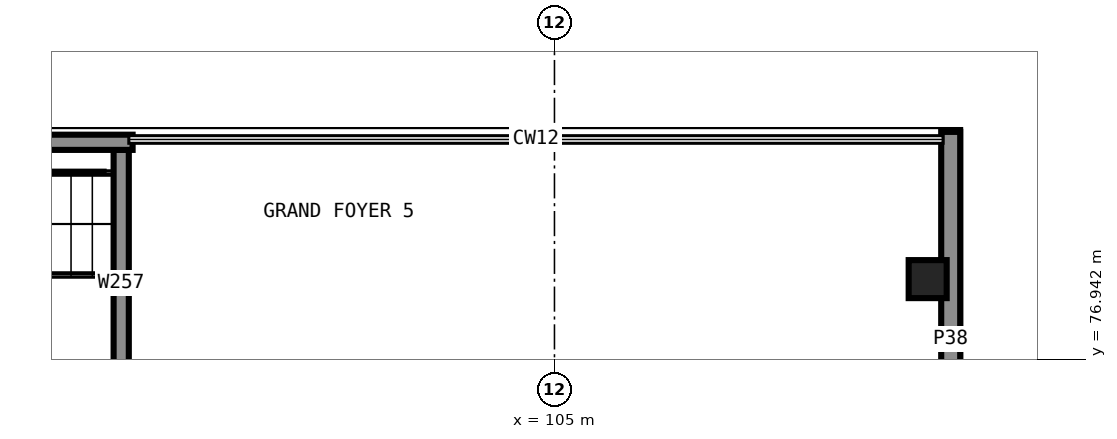
"""IFC4 building model, lengths in metres.
Left out: names, types, materials, properties, quantities, classifications, styles, units other than length and angle.
Written with IfcOpenShell. Run it as: python <this file> out.ifc"""

import sys

from ifc_helpers import new_model, si_unit, direction, frame, frame_2d, origin, origin_2d, place, context, subcontext, project, spatial, rectangle, extrude, element, save


model = new_model("IFC4")
c1 = context("Model", 3, precision=1e-05, world=origin(), true_north=direction((0.0, 1.0)))
c2 = subcontext(c1, "Body", "Model", "MODEL_VIEW")
j1 = project(units=[si_unit("LENGTHUNIT", "METRE"), si_unit("PLANEANGLEUNIT", "RADIAN")], contexts=[c1])
p1 = place(None, origin())
s1 = spatial("IfcSite", under=j1, at=p1, CompositionType="ELEMENT")
p2 = place(p1, origin())
s2 = spatial("IfcBuilding", under=s1, at=p2, CompositionType="ELEMENT")
p3 = place(p2, origin())
s3 = spatial("IfcBuildingStorey", under=s2, at=p3, CompositionType="ELEMENT", Elevation=0.0)
p4 = place(p3, frame((99.45, 79.8, 0.0), z_axis=(0.0, 0.0, 1.0), x_axis=(-1.0, 0.0, 0.0)))
e1 = element("IfcWall", 1, at=p4, inside=s3, PredefinedType="SHEAR", context=c2, shape_type="SweptSolid", body=[
    extrude(rectangle(XDim=7.5, YDim=0.2, at=frame_2d((3.75, 0.0))), origin(), (0.0, 0.0, 1.0), 5.5),
])
p5 = place(p4, frame((6.0, 0.0, 0.0)))
e2 = element("IfcOpeningElement", 2, at=p5, cuts=e1, PredefinedType="OPENING", context=c2, shape_type="SweptSolid", body=[
    extrude(rectangle(XDim=1.1, YDim=2.1, at=frame_2d((0.55, 1.05))), frame((0.0, 0.11, 0.0), z_axis=(0.0, -1.0, 0.0), x_axis=(1.0, 0.0, 0.0)), (0.0, 0.0, 1.0), 0.22),
])
p6 = place(p3, frame((99.3, 76.2, 0.0), z_axis=(0.0, 0.0, 1.0), x_axis=(0.0, 1.0, 0.0)))
e3 = element("IfcWall", 3, at=p6, inside=s3, PredefinedType="SHEAR", context=c2, shape_type="SweptSolid", body=[
    extrude(rectangle(XDim=3.5, YDim=0.2, at=frame_2d((1.75, 0.0))), origin(), (0.0, 0.0, 1.0), 5.5),
])
p7 = place(p3, frame((109.91, 78.0, 0.0), z_axis=(0.0, 0.0, 1.0), x_axis=(1.0, 0.0, 0.0)))
e4 = element("IfcColumn", 4, at=p7, inside=s3, PredefinedType="COLUMN", context=c2, shape_type="SweptSolid", body=[
    extrude(rectangle(XDim=0.5, YDim=0.5, at=origin_2d()), origin(), (0.0, 0.0, 1.0), 5.5),
])
p8 = place(p3, frame((110.213, 59.4, 0.0), z_axis=(0.0, 0.0, 1.0), x_axis=(0.0, 1.0, 0.0)))
e5 = element("IfcWall", 5, at=p8, inside=s3, PredefinedType="SOLIDWALL", context=c2, shape_type="SweptSolid", body=[
    extrude(rectangle(XDim=20.537, YDim=0.25, at=frame_2d((10.269, 0.0))), origin(), (0.0, 0.0, 1.0), 5.2),
])
p9 = place(p8, frame((2.6, 0.0, 0.0)))
e6 = element("IfcOpeningElement", 6, at=p9, cuts=e5, PredefinedType="OPENING", context=c2, shape_type="SweptSolid", body=[
    extrude(rectangle(XDim=2.0, YDim=2.1, at=frame_2d((1.0, 1.05))), frame((0.0, 0.135, 0.0), z_axis=(0.0, -1.0, 0.0), x_axis=(1.0, 0.0, 0.0)), (0.0, 0.0, 1.0), 0.27),
])
p10 = place(p8, frame((8.6, 0.0, 0.0)))
e7 = element("IfcOpeningElement", 7, at=p10, cuts=e5, PredefinedType="OPENING", context=c2, shape_type="SweptSolid", body=[
    extrude(rectangle(XDim=2.0, YDim=2.1, at=frame_2d((1.0, 1.05))), frame((0.0, 0.135, 0.0), z_axis=(0.0, -1.0, 0.0), x_axis=(1.0, 0.0, 0.0)), (0.0, 0.0, 1.0), 0.27),
])
save(model, sys.argv[1])
